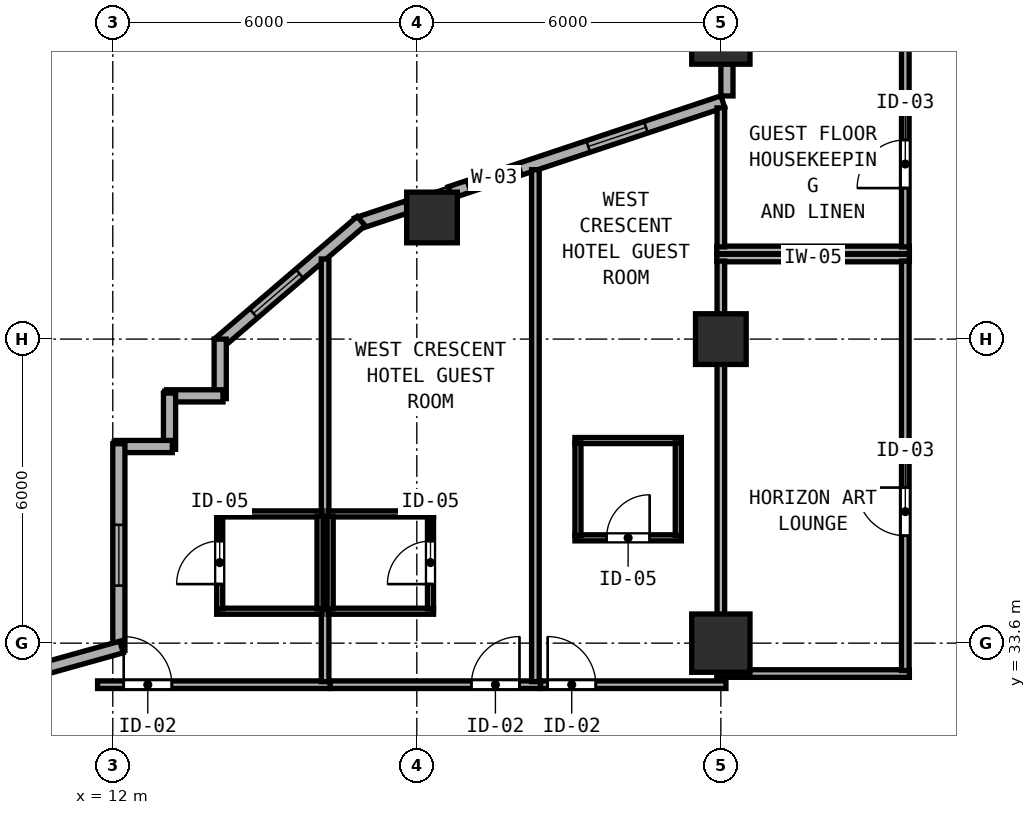
"""IFC4 building model, lengths in metres.
Left out: names, types, materials, properties, quantities, classifications, styles, units other than length and angle.
Written with IfcOpenShell. Run it as: python <this file> out.ifc"""

import sys

from ifc_helpers import new_model, si_unit, direction, frame, frame_2d, origin, origin_2d, place, context, subcontext, project, spatial, rectangle, hollow_rectangle, extrude, element, fill, save


model = new_model("IFC4")
c1 = context("Model", 3, precision=1e-05, world=origin(), true_north=direction((0.0, 1.0)))
c2 = subcontext(c1, "Body", "Model", "MODEL_VIEW")
j1 = project(units=[si_unit("LENGTHUNIT", "METRE"), si_unit("PLANEANGLEUNIT", "RADIAN")], contexts=[c1])
p1 = place(None, origin())
s1 = spatial("IfcSite", under=j1, at=p1, CompositionType="ELEMENT")
p2 = place(p1, origin())
s2 = spatial("IfcBuilding", under=s1, at=p2, CompositionType="ELEMENT")
p3 = place(p2, frame((0.0, 0.0, 78.0)))
s3 = spatial("IfcBuildingStorey", under=s2, at=p3, CompositionType="ELEMENT", Elevation=78.0)
for number, where, z_axis, x_axis in (
    (1, (24.0, 33.6, 0.0), (0.0, 0.0, 1.0), (1.0, 0.0, 0.0)),
    (2, (24.0, 45.6, 0.0), (0.0, 0.0, 1.0), (1.0, 0.0, 0.0)),
):
    element("IfcColumn", number, at=place(p3, frame(where, z_axis=z_axis, x_axis=x_axis)), inside=s3, PredefinedType="COLUMN", context=c2, shape_type="SweptSolid", body=[
        extrude(hollow_rectangle(XDim=1.15, YDim=1.15, WallThickness=0.042, at=origin_2d()), origin(), (0.0, 0.0, 1.0), 3.8),
    ])
for number, where, z_axis, x_axis in (
    (3, (24.0, 39.6, 0.0), (0.0, 0.0, 1.0), (1.0, 0.0, 0.0)),
    (4, (18.3, 42.0, 0.0), (0.0, 0.0, 1.0), (1.0, 0.0, 0.0)),
):
    element("IfcColumn", number, at=place(p3, frame(where, z_axis=z_axis, x_axis=x_axis)), inside=s3, PredefinedType="COLUMN", context=c2, shape_type="SweptSolid", body=[
        extrude(hollow_rectangle(XDim=1.0, YDim=1.0, WallThickness=0.038, at=origin_2d()), origin(), (0.0, 0.0, 1.0), 3.8),
    ])
p4 = place(p3, frame((24.12, 45.033, 0.0), z_axis=(0.0, 0.0, 1.0), x_axis=(0.0, -1.0, 0.0)))
e5 = element("IfcWall", 5, at=p4, inside=s3, PredefinedType="SOLIDWALL", context=c2, shape_type="SweptSolid", body=[
    extrude(rectangle(XDim=0.635, YDim=0.24, at=frame_2d((0.317, 0.0))), origin(), (0.0, 0.0, 1.0), 3.097),
])
p5 = place(p3, frame((24.039, 44.287, 0.0), z_axis=(0.0, 0.0, 1.0), x_axis=(-0.948678995954, -0.316240672014, 0.0)))
e6 = element("IfcWall", 6, at=p5, inside=s3, PredefinedType="SOLIDWALL", context=c2, shape_type="SweptSolid", body=[
    extrude(rectangle(XDim=5.675, YDim=0.24, at=frame_2d((2.837, 0.0))), origin(), (0.0, 0.0, 1.0), 3.097),
])
p6 = place(p5, frame((1.6, 0.0, 0.85)))
e7 = element("IfcOpeningElement", 7, at=p6, cuts=e6, PredefinedType="OPENING", context=c2, shape_type="SweptSolid", body=[
    extrude(rectangle(XDim=1.2, YDim=1.85, at=frame_2d((0.6, 0.925))), frame((0.0, 0.13, 0.0), z_axis=(0.0, -1.0, 0.0), x_axis=(1.0, 0.0, 0.0)), (0.0, 0.0, 1.0), 0.26),
])
p7 = place(p5, frame((4.206, 0.0, 0.85)))
e8 = element("IfcOpeningElement", 8, at=p7, cuts=e6, PredefinedType="OPENING", context=c2, shape_type="SweptSolid", body=[
    extrude(rectangle(XDim=1.1, YDim=1.75, at=frame_2d((0.55, 0.875))), frame((0.0, 0.13, 0.0), z_axis=(0.0, -1.0, 0.0), x_axis=(1.0, 0.0, 0.0)), (0.0, 0.0, 1.0), 0.26),
])
p8 = place(p3, frame((17.808, 42.209, 0.0), z_axis=(0.0, 0.0, 1.0), x_axis=(-0.948706457285, -0.316158279832, 0.0)))
e9 = element("IfcWall", 9, at=p8, inside=s3, PredefinedType="SOLIDWALL", context=c2, shape_type="SweptSolid", body=[
    extrude(rectangle(XDim=1.054, YDim=0.24, at=frame_2d((0.527, 0.0))), origin(), (0.0, 0.0, 1.0), 3.6),
])
p9 = place(p3, frame((16.902, 41.929, 0.0), z_axis=(0.0, 0.0, 1.0), x_axis=(-0.759275136126, -0.650769750112, 0.0)))
e10 = element("IfcWall", 10, at=p9, inside=s3, PredefinedType="SOLIDWALL", context=c2, shape_type="SweptSolid", body=[
    extrude(rectangle(XDim=3.719, YDim=0.24, at=frame_2d((1.86, 0.0))), origin(), (0.0, 0.0, 1.0), 3.6),
])
p10 = place(p9, frame((1.6, 0.0, 0.85)))
e11 = element("IfcOpeningElement", 11, at=p10, cuts=e10, PredefinedType="OPENING", context=c2, shape_type="SweptSolid", body=[
    extrude(rectangle(XDim=1.2, YDim=1.85, at=frame_2d((0.6, 0.925))), frame((0.0, 0.13, 0.0), z_axis=(0.0, -1.0, 0.0), x_axis=(1.0, 0.0, 0.0)), (0.0, 0.0, 1.0), 0.26),
])
p11 = place(p3, frame((14.12, 39.6, 0.0), z_axis=(0.0, 0.0, 1.0), x_axis=(0.0, -1.0, 0.0)))
e12 = element("IfcWall", 12, at=p11, inside=s3, PredefinedType="SOLIDWALL", context=c2, shape_type="SweptSolid", body=[
    extrude(rectangle(XDim=1.175, YDim=0.24, at=frame_2d((0.587, 0.0))), origin(), (0.0, 0.0, 1.0), 3.6),
])
p12 = place(p3, frame((14.175, 38.48, 0.0), z_axis=(0.0, 0.0, 1.0), x_axis=(-1.0, 0.0, 0.0)))
e13 = element("IfcWall", 13, at=p12, inside=s3, PredefinedType="SOLIDWALL", context=c2, shape_type="SweptSolid", body=[
    extrude(rectangle(XDim=1.11, YDim=0.24, at=frame_2d((0.555, 0.0))), origin(), (0.0, 0.0, 1.0), 3.6),
])
p13 = place(p3, frame((13.12, 38.535, 0.0), z_axis=(0.0, 0.0, 1.0), x_axis=(0.0, -1.0, 0.0)))
e14 = element("IfcWall", 14, at=p13, inside=s3, PredefinedType="SOLIDWALL", context=c2, shape_type="SweptSolid", body=[
    extrude(rectangle(XDim=1.11, YDim=0.24, at=frame_2d((0.555, 0.0))), origin(), (0.0, 0.0, 1.0), 3.6),
])
p14 = place(p3, frame((13.175, 37.48, 0.0), z_axis=(0.0, 0.0, 1.0), x_axis=(-1.0, 0.0, 0.0)))
e15 = element("IfcWall", 15, at=p14, inside=s3, PredefinedType="SOLIDWALL", context=c2, shape_type="SweptSolid", body=[
    extrude(rectangle(XDim=1.11, YDim=0.24, at=frame_2d((0.555, 0.0))), origin(), (0.0, 0.0, 1.0), 3.6),
])
p15 = place(p3, frame((12.12, 37.535, 0.0), z_axis=(0.0, 0.0, 1.0), x_axis=(0.0, -1.0, 0.0)))
e16 = element("IfcWall", 16, at=p15, inside=s3, PredefinedType="SOLIDWALL", context=c2, shape_type="SweptSolid", body=[
    extrude(rectangle(XDim=4.081, YDim=0.24, at=frame_2d((2.041, 0.0))), origin(), (0.0, 0.0, 1.0), 3.6),
])
p16 = place(p15, frame((1.6, 0.0, 0.85)))
e17 = element("IfcOpeningElement", 17, at=p16, cuts=e16, PredefinedType="OPENING", context=c2, shape_type="SweptSolid", body=[
    extrude(rectangle(XDim=1.2, YDim=1.85, at=frame_2d((0.6, 0.925))), frame((0.0, 0.13, 0.0), z_axis=(0.0, -1.0, 0.0), x_axis=(1.0, 0.0, 0.0)), (0.0, 0.0, 1.0), 0.26),
])
p17 = place(p3, frame((12.173, 33.524, 0.0), z_axis=(0.0, 0.0, 1.0), x_axis=(-0.963197271032, -0.268795493036, 0.0)))
e18 = element("IfcWall", 18, at=p17, inside=s3, PredefinedType="SOLIDWALL", context=c2, shape_type="SweptSolid", body=[
    extrude(rectangle(XDim=9.095, YDim=0.24, at=frame_2d((4.548, 0.0))), origin(), (0.0, 0.0, 1.0), 3.6),
])
p18 = place(p17, frame((1.6, 0.0, 0.85)))
e19 = element("IfcOpeningElement", 19, at=p18, cuts=e18, PredefinedType="OPENING", context=c2, shape_type="SweptSolid", body=[
    extrude(rectangle(XDim=1.2, YDim=1.85, at=frame_2d((0.6, 0.925))), frame((0.0, 0.13, 0.0), z_axis=(0.0, -1.0, 0.0), x_axis=(1.0, 0.0, 0.0)), (0.0, 0.0, 1.0), 0.26),
])
p19 = place(p17, frame((7.0, 0.0, 0.85)))
e20 = element("IfcOpeningElement", 20, at=p19, cuts=e18, PredefinedType="OPENING", context=c2, shape_type="SweptSolid", body=[
    extrude(rectangle(XDim=1.2, YDim=1.85, at=frame_2d((0.6, 0.925))), frame((0.0, 0.13, 0.0), z_axis=(0.0, -1.0, 0.0), x_axis=(1.0, 0.0, 0.0)), (0.0, 0.0, 1.0), 0.26),
])
for number, where, z_axis, x_axis in (
    (21, (23.92, 41.2, 0.0), (0.0, 0.0, 1.0), (1.0, 0.0, 0.0)),
    (22, (23.92, 33.0, 0.0), (0.0, 0.0, 1.0), (1.0, 0.0, 0.0)),
):
    element("IfcWall", number, at=place(p3, frame(where, z_axis=z_axis, x_axis=x_axis)), inside=s3, PredefinedType="PARTITIONING", context=c2, shape_type="SweptSolid", body=[
        extrude(rectangle(XDim=3.8, YDim=0.15, at=frame_2d((1.9, 0.0))), origin(), (0.0, 0.0, 1.0), 3.6),
    ])
p20 = place(p3, frame((24.0, 33.06, 0.0), z_axis=(0.0, 0.0, 1.0), x_axis=(0.0, 1.0, 0.0)))
e23 = element("IfcWall", 23, at=p20, inside=s3, PredefinedType="PARTITIONING", context=c2, shape_type="SweptSolid", body=[
    extrude(rectangle(XDim=8.08, YDim=0.15, at=frame_2d((4.04, 0.0))), origin(), (0.0, 0.0, 1.0), 3.097),
])
p21 = place(p3, frame((27.64, 33.06, 0.0), z_axis=(0.0, 0.0, 1.0), x_axis=(0.0, 1.0, 0.0)))
e24 = element("IfcWall", 24, at=p21, inside=s3, PredefinedType="PARTITIONING", context=c2, shape_type="SweptSolid", body=[
    extrude(rectangle(XDim=8.08, YDim=0.15, at=frame_2d((4.04, 0.0))), origin(), (0.0, 0.0, 1.0), 3.6),
])
p22 = place(p21, frame((3.61, 0.0, 0.0), z_axis=(0.0, 0.0, 1.0), x_axis=(-1.0, 0.0, 0.0)))
e25 = element("IfcOpeningElement", 25, at=p22, cuts=e24, PredefinedType="OPENING", context=c2, shape_type="SweptSolid", body=[
    extrude(rectangle(XDim=0.95, YDim=2.12, at=frame_2d((0.475, 1.06))), frame((0.0, 0.085, 0.0), z_axis=(0.0, -1.0, 0.0), x_axis=(1.0, 0.0, 0.0)), (0.0, 0.0, 1.0), 0.17),
])
p23 = place(p3, frame((23.92, 41.36, 0.0), z_axis=(0.0, 0.0, 1.0), x_axis=(1.0, 0.0, 0.0)))
e26 = element("IfcWall", 26, at=p23, inside=s3, PredefinedType="PARTITIONING", context=c2, shape_type="SweptSolid", body=[
    extrude(rectangle(XDim=3.8, YDim=0.15, at=frame_2d((1.9, 0.0))), origin(), (0.0, 0.0, 1.0), 3.6),
])
p24 = place(p3, frame((24.0, 41.42, 0.0), z_axis=(0.0, 0.0, 1.0), x_axis=(0.0, 1.0, 0.0)))
e27 = element("IfcWall", 27, at=p24, inside=s3, PredefinedType="PARTITIONING", context=c2, shape_type="SweptSolid", body=[
    extrude(rectangle(XDim=2.743, YDim=0.15, at=frame_2d((1.372, 0.0))), origin(), (0.0, 0.0, 1.0), 3.097),
])
p25 = place(p3, frame((27.64, 41.42, 0.0), z_axis=(0.0, 0.0, 1.0), x_axis=(0.0, 1.0, 0.0)))
e28 = element("IfcWall", 28, at=p25, inside=s3, PredefinedType="PARTITIONING", context=c2, shape_type="SweptSolid", body=[
    extrude(rectangle(XDim=4.54, YDim=0.15, at=frame_2d((2.27, 0.0))), origin(), (0.0, 0.0, 1.0), 3.6),
])
p26 = place(p25, frame((2.11, 0.0, 0.0), z_axis=(0.0, 0.0, 1.0), x_axis=(-1.0, 0.0, 0.0)))
e29 = element("IfcOpeningElement", 29, at=p26, cuts=e28, PredefinedType="OPENING", context=c2, shape_type="SweptSolid", body=[
    extrude(rectangle(XDim=0.95, YDim=2.12, at=frame_2d((0.475, 1.06))), frame((0.0, 0.085, 0.0), z_axis=(0.0, -1.0, 0.0), x_axis=(1.0, 0.0, 0.0)), (0.0, 0.0, 1.0), 0.17),
])
p27 = place(p3, frame((11.7, 32.78, 0.0), z_axis=(0.0, 0.0, 1.0), x_axis=(1.0, 0.0, 0.0)))
e30 = element("IfcWall", 30, at=p27, inside=s3, PredefinedType="PARTITIONING", context=c2, shape_type="SweptSolid", body=[
    extrude(rectangle(XDim=4.59, YDim=0.15, at=frame_2d((2.295, 0.0))), origin(), (0.0, 0.0, 1.0), 3.6),
])
p28 = place(p27, frame((0.516, 0.0, 0.0)))
e31 = element("IfcOpeningElement", 31, at=p28, cuts=e30, PredefinedType="OPENING", context=c2, shape_type="SweptSolid", body=[
    extrude(rectangle(XDim=0.95, YDim=2.15, at=frame_2d((0.475, 1.075))), frame((0.0, 0.085, 0.0), z_axis=(0.0, -1.0, 0.0), x_axis=(1.0, 0.0, 0.0)), (0.0, 0.0, 1.0), 0.17),
])
p29 = place(p3, frame((16.19, 32.84, 0.0), z_axis=(0.0, 0.0, 1.0), x_axis=(0.0, 1.0, 0.0)))
e32 = element("IfcWall", 32, at=p29, inside=s3, PredefinedType="PARTITIONING", context=c2, shape_type="SweptSolid", body=[
    extrude(rectangle(XDim=8.341, YDim=0.15, at=frame_2d((4.17, 0.0))), origin(), (0.0, 0.0, 1.0), 3.6),
])
for number, where, z_axis, x_axis in (
    (33, (14.05, 36.15, 0.0), (0.0, 0.0, 1.0), (1.0, 0.0, 0.0)),
    (34, (14.05, 34.23, 0.0), (0.0, 0.0, 1.0), (1.0, 0.0, 0.0)),
):
    element("IfcWall", number, at=place(p3, frame(where, z_axis=z_axis, x_axis=x_axis)), inside=s3, PredefinedType="PARTITIONING", context=c2, shape_type="SweptSolid", body=[
        extrude(rectangle(XDim=2.08, YDim=0.12, at=frame_2d((1.04, 0.0))), origin(), (0.0, 0.0, 1.0), 3.6),
    ])
p30 = place(p3, frame((14.11, 34.275, 0.0), z_axis=(0.0, 0.0, 1.0), x_axis=(0.0, 1.0, 0.0)))
e35 = element("IfcWall", 35, at=p30, inside=s3, PredefinedType="PARTITIONING", context=c2, shape_type="SweptSolid", body=[
    extrude(rectangle(XDim=1.83, YDim=0.12, at=frame_2d((0.915, 0.0))), origin(), (0.0, 0.0, 1.0), 3.6),
])
p31 = place(p30, frame((1.34, 0.0, 0.0), z_axis=(0.0, 0.0, 1.0), x_axis=(-1.0, 0.0, 0.0)))
e36 = element("IfcOpeningElement", 36, at=p31, cuts=e35, PredefinedType="OPENING", context=c2, shape_type="SweptSolid", body=[
    extrude(rectangle(XDim=0.85, YDim=2.1, at=frame_2d((0.425, 1.05))), frame((0.0, 0.07, 0.0), z_axis=(0.0, -1.0, 0.0), x_axis=(1.0, 0.0, 0.0)), (0.0, 0.0, 1.0), 0.14),
])
p32 = place(p3, frame((16.09, 34.275, 0.0), z_axis=(0.0, 0.0, 1.0), x_axis=(0.0, 1.0, 0.0)))
e37 = element("IfcWall", 37, at=p32, inside=s3, PredefinedType="PARTITIONING", context=c2, shape_type="SweptSolid", body=[
    extrude(rectangle(XDim=1.83, YDim=0.12, at=frame_2d((0.915, 0.0))), origin(), (0.0, 0.0, 1.0), 3.6),
])
p33 = place(p3, frame((16.292, 32.78, 0.0), z_axis=(0.0, 0.0, 1.0), x_axis=(1.0, 0.0, 0.0)))
e38 = element("IfcWall", 38, at=p33, inside=s3, PredefinedType="PARTITIONING", context=c2, shape_type="SweptSolid", body=[
    extrude(rectangle(XDim=4.148, YDim=0.15, at=frame_2d((2.074, 0.0))), origin(), (0.0, 0.0, 1.0), 3.6),
])
p34 = place(p33, frame((2.784, 0.0, 0.0)))
e39 = element("IfcOpeningElement", 39, at=p34, cuts=e38, PredefinedType="OPENING", context=c2, shape_type="SweptSolid", body=[
    extrude(rectangle(XDim=0.95, YDim=2.15, at=frame_2d((0.475, 1.075))), frame((0.0, 0.085, 0.0), z_axis=(0.0, -1.0, 0.0), x_axis=(1.0, 0.0, 0.0)), (0.0, 0.0, 1.0), 0.17),
])
p35 = place(p3, frame((20.34, 32.84, 0.0), z_axis=(0.0, 0.0, 1.0), x_axis=(0.0, 1.0, 0.0)))
e40 = element("IfcWall", 40, at=p35, inside=s3, PredefinedType="PARTITIONING", context=c2, shape_type="SweptSolid", body=[
    extrude(rectangle(XDim=10.103, YDim=0.15, at=frame_2d((5.051, 0.0))), origin(), (0.0, 0.0, 1.0), 3.6),
])
for number, where, z_axis, x_axis in (
    (41, (16.25, 36.15, 0.0), (0.0, 0.0, 1.0), (1.0, 0.0, 0.0)),
    (42, (16.25, 34.23, 0.0), (0.0, 0.0, 1.0), (1.0, 0.0, 0.0)),
):
    element("IfcWall", number, at=place(p3, frame(where, z_axis=z_axis, x_axis=x_axis)), inside=s3, PredefinedType="PARTITIONING", context=c2, shape_type="SweptSolid", body=[
        extrude(rectangle(XDim=2.08, YDim=0.12, at=frame_2d((1.04, 0.0))), origin(), (0.0, 0.0, 1.0), 3.6),
    ])
p36 = place(p3, frame((16.29, 34.275, 0.0), z_axis=(0.0, 0.0, 1.0), x_axis=(0.0, 1.0, 0.0)))
e43 = element("IfcWall", 43, at=p36, inside=s3, PredefinedType="PARTITIONING", context=c2, shape_type="SweptSolid", body=[
    extrude(rectangle(XDim=1.83, YDim=0.12, at=frame_2d((0.915, 0.0))), origin(), (0.0, 0.0, 1.0), 3.6),
])
p37 = place(p3, frame((18.27, 34.275, 0.0), z_axis=(0.0, 0.0, 1.0), x_axis=(0.0, 1.0, 0.0)))
e44 = element("IfcWall", 44, at=p37, inside=s3, PredefinedType="PARTITIONING", context=c2, shape_type="SweptSolid", body=[
    extrude(rectangle(XDim=1.83, YDim=0.12, at=frame_2d((0.915, 0.0))), origin(), (0.0, 0.0, 1.0), 3.6),
])
p38 = place(p37, frame((0.49, 0.0, 0.0)))
e45 = element("IfcOpeningElement", 45, at=p38, cuts=e44, PredefinedType="OPENING", context=c2, shape_type="SweptSolid", body=[
    extrude(rectangle(XDim=0.85, YDim=2.1, at=frame_2d((0.425, 1.05))), frame((0.0, 0.07, 0.0), z_axis=(0.0, -1.0, 0.0), x_axis=(1.0, 0.0, 0.0)), (0.0, 0.0, 1.0), 0.14),
])
p39 = place(p3, frame((20.442, 32.78, 0.0), z_axis=(0.0, 0.0, 1.0), x_axis=(1.0, 0.0, 0.0)))
e46 = element("IfcWall", 46, at=p39, inside=s3, PredefinedType="PARTITIONING", context=c2, shape_type="SweptSolid", body=[
    extrude(rectangle(XDim=3.658, YDim=0.15, at=frame_2d((1.829, 0.0))), origin(), (0.0, 0.0, 1.0), 3.6),
])
p40 = place(p39, frame((0.14, 0.0, 0.0)))
e47 = element("IfcOpeningElement", 47, at=p40, cuts=e46, PredefinedType="OPENING", context=c2, shape_type="SweptSolid", body=[
    extrude(rectangle(XDim=0.95, YDim=2.15, at=frame_2d((0.475, 1.075))), frame((0.0, 0.085, 0.0), z_axis=(0.0, -1.0, 0.0), x_axis=(1.0, 0.0, 0.0)), (0.0, 0.0, 1.0), 0.17),
])
p41 = place(p3, frame((21.12, 37.598, 0.0), z_axis=(0.0, 0.0, 1.0), x_axis=(1.0, 0.0, 0.0)))
e48 = element("IfcWall", 48, at=p41, inside=s3, PredefinedType="PARTITIONING", context=c2, shape_type="SweptSolid", body=[
    extrude(rectangle(XDim=2.1, YDim=0.12, at=frame_2d((1.05, 0.0))), origin(), (0.0, 0.0, 1.0), 3.6),
])
p42 = place(p3, frame((21.12, 35.678, 0.0), z_axis=(0.0, 0.0, 1.0), x_axis=(1.0, 0.0, 0.0)))
e49 = element("IfcWall", 49, at=p42, inside=s3, PredefinedType="PARTITIONING", context=c2, shape_type="SweptSolid", body=[
    extrude(rectangle(XDim=2.1, YDim=0.12, at=frame_2d((1.05, 0.0))), origin(), (0.0, 0.0, 1.0), 3.6),
])
p43 = place(p42, frame((0.625, 0.0, 0.0)))
e50 = element("IfcOpeningElement", 50, at=p43, cuts=e49, PredefinedType="OPENING", context=c2, shape_type="SweptSolid", body=[
    extrude(rectangle(XDim=0.85, YDim=2.1, at=frame_2d((0.425, 1.05))), frame((0.0, 0.07, 0.0), z_axis=(0.0, -1.0, 0.0), x_axis=(1.0, 0.0, 0.0)), (0.0, 0.0, 1.0), 0.14),
])
for number, where, z_axis, x_axis in (
    (51, (21.18, 35.723, 0.0), (0.0, 0.0, 1.0), (0.0, 1.0, 0.0)),
    (52, (23.16, 35.723, 0.0), (0.0, 0.0, 1.0), (0.0, 1.0, 0.0)),
):
    element("IfcWall", number, at=place(p3, frame(where, z_axis=z_axis, x_axis=x_axis)), inside=s3, PredefinedType="PARTITIONING", context=c2, shape_type="SweptSolid", body=[
        extrude(rectangle(XDim=1.83, YDim=0.12, at=frame_2d((0.915, 0.0))), origin(), (0.0, 0.0, 1.0), 3.6),
    ])
p44 = place(p6, origin())
e53 = element("IfcWindow", 53, at=p44, inside=s3, PartitioningType="SINGLE_PANEL", PredefinedType="WINDOW", context=c2, shape_type="SweptSolid", body=[
    extrude(rectangle(XDim=1.2, YDim=1.85, at=frame_2d((0.6, 0.925))), frame((0.0, 0.03, 0.0), z_axis=(0.0, -1.0, 0.0), x_axis=(1.0, 0.0, 0.0)), (0.0, 0.0, 1.0), 0.06),
])
fill(e7, e53)
p45 = place(p10, origin())
e54 = element("IfcWindow", 54, at=p45, inside=s3, PartitioningType="SINGLE_PANEL", PredefinedType="WINDOW", context=c2, shape_type="SweptSolid", body=[
    extrude(rectangle(XDim=1.2, YDim=1.85, at=frame_2d((0.6, 0.925))), frame((0.0, 0.03, 0.0), z_axis=(0.0, -1.0, 0.0), x_axis=(1.0, 0.0, 0.0)), (0.0, 0.0, 1.0), 0.06),
])
fill(e11, e54)
p46 = place(p16, origin())
e55 = element("IfcWindow", 55, at=p46, inside=s3, PartitioningType="SINGLE_PANEL", PredefinedType="WINDOW", context=c2, shape_type="SweptSolid", body=[
    extrude(rectangle(XDim=1.2, YDim=1.85, at=frame_2d((0.6, 0.925))), frame((0.0, 0.03, 0.0), z_axis=(0.0, -1.0, 0.0), x_axis=(1.0, 0.0, 0.0)), (0.0, 0.0, 1.0), 0.06),
])
fill(e17, e55)
p47 = place(p22, origin())
e56 = element("IfcDoor", 56, at=p47, inside=s3, OperationType="SINGLE_SWING_LEFT", PredefinedType="DOOR", context=c2, shape_type="SweptSolid", body=[
    extrude(rectangle(XDim=0.95, YDim=2.12, at=frame_2d((0.475, 1.06))), frame((0.0, 0.025, 0.0), z_axis=(0.0, -1.0, 0.0), x_axis=(1.0, 0.0, 0.0)), (0.0, 0.0, 1.0), 0.05),
])
fill(e25, e56)
p48 = place(p26, origin())
e57 = element("IfcDoor", 57, at=p48, inside=s3, OperationType="SINGLE_SWING_RIGHT", PredefinedType="DOOR", context=c2, shape_type="SweptSolid", body=[
    extrude(rectangle(XDim=0.95, YDim=2.12, at=frame_2d((0.475, 1.06))), frame((0.0, 0.025, 0.0), z_axis=(0.0, -1.0, 0.0), x_axis=(1.0, 0.0, 0.0)), (0.0, 0.0, 1.0), 0.05),
])
fill(e29, e57)
p49 = place(p28, origin())
e58 = element("IfcDoor", 58, at=p49, inside=s3, OperationType="SINGLE_SWING_LEFT", PredefinedType="DOOR", context=c2, shape_type="SweptSolid", body=[
    extrude(rectangle(XDim=0.95, YDim=2.15, at=frame_2d((0.475, 1.075))), frame((0.0, 0.025, 0.0), z_axis=(0.0, -1.0, 0.0), x_axis=(1.0, 0.0, 0.0)), (0.0, 0.0, 1.0), 0.05),
])
fill(e31, e58)
p50 = place(p31, origin())
e59 = element("IfcDoor", 59, at=p50, inside=s3, OperationType="SINGLE_SWING_RIGHT", PredefinedType="DOOR", context=c2, shape_type="SweptSolid", body=[
    extrude(rectangle(XDim=0.85, YDim=2.1, at=frame_2d((0.425, 1.05))), frame((0.0, 0.025, 0.0), z_axis=(0.0, -1.0, 0.0), x_axis=(1.0, 0.0, 0.0)), (0.0, 0.0, 1.0), 0.05),
])
fill(e36, e59)
p51 = place(p34, origin())
e60 = element("IfcDoor", 60, at=p51, inside=s3, OperationType="SINGLE_SWING_RIGHT", PredefinedType="DOOR", context=c2, shape_type="SweptSolid", body=[
    extrude(rectangle(XDim=0.95, YDim=2.15, at=frame_2d((0.475, 1.075))), frame((0.0, 0.025, 0.0), z_axis=(0.0, -1.0, 0.0), x_axis=(1.0, 0.0, 0.0)), (0.0, 0.0, 1.0), 0.05),
])
fill(e39, e60)
p52 = place(p38, origin())
e61 = element("IfcDoor", 61, at=p52, inside=s3, OperationType="SINGLE_SWING_LEFT", PredefinedType="DOOR", context=c2, shape_type="SweptSolid", body=[
    extrude(rectangle(XDim=0.85, YDim=2.1, at=frame_2d((0.425, 1.05))), frame((0.0, 0.025, 0.0), z_axis=(0.0, -1.0, 0.0), x_axis=(1.0, 0.0, 0.0)), (0.0, 0.0, 1.0), 0.05),
])
fill(e45, e61)
p53 = place(p40, origin())
e62 = element("IfcDoor", 62, at=p53, inside=s3, OperationType="SINGLE_SWING_LEFT", PredefinedType="DOOR", context=c2, shape_type="SweptSolid", body=[
    extrude(rectangle(XDim=0.95, YDim=2.15, at=frame_2d((0.475, 1.075))), frame((0.0, 0.025, 0.0), z_axis=(0.0, -1.0, 0.0), x_axis=(1.0, 0.0, 0.0)), (0.0, 0.0, 1.0), 0.05),
])
fill(e47, e62)
p54 = place(p43, origin())
e63 = element("IfcDoor", 63, at=p54, inside=s3, OperationType="SINGLE_SWING_RIGHT", PredefinedType="DOOR", context=c2, shape_type="SweptSolid", body=[
    extrude(rectangle(XDim=0.85, YDim=2.1, at=frame_2d((0.425, 1.05))), frame((0.0, 0.025, 0.0), z_axis=(0.0, -1.0, 0.0), x_axis=(1.0, 0.0, 0.0)), (0.0, 0.0, 1.0), 0.05),
])
fill(e50, e63)
p55 = place(p7, origin())
e64 = element("IfcWindow", 64, at=p55, inside=s3, PartitioningType="SINGLE_PANEL", PredefinedType="WINDOW", context=c2, shape_type="SweptSolid", body=[
    extrude(rectangle(XDim=1.1, YDim=1.75, at=frame_2d((0.55, 0.875))), frame((0.0, 0.03, 0.0), z_axis=(0.0, -1.0, 0.0), x_axis=(1.0, 0.0, 0.0)), (0.0, 0.0, 1.0), 0.06),
])
fill(e8, e64)
save(model, sys.argv[1])
